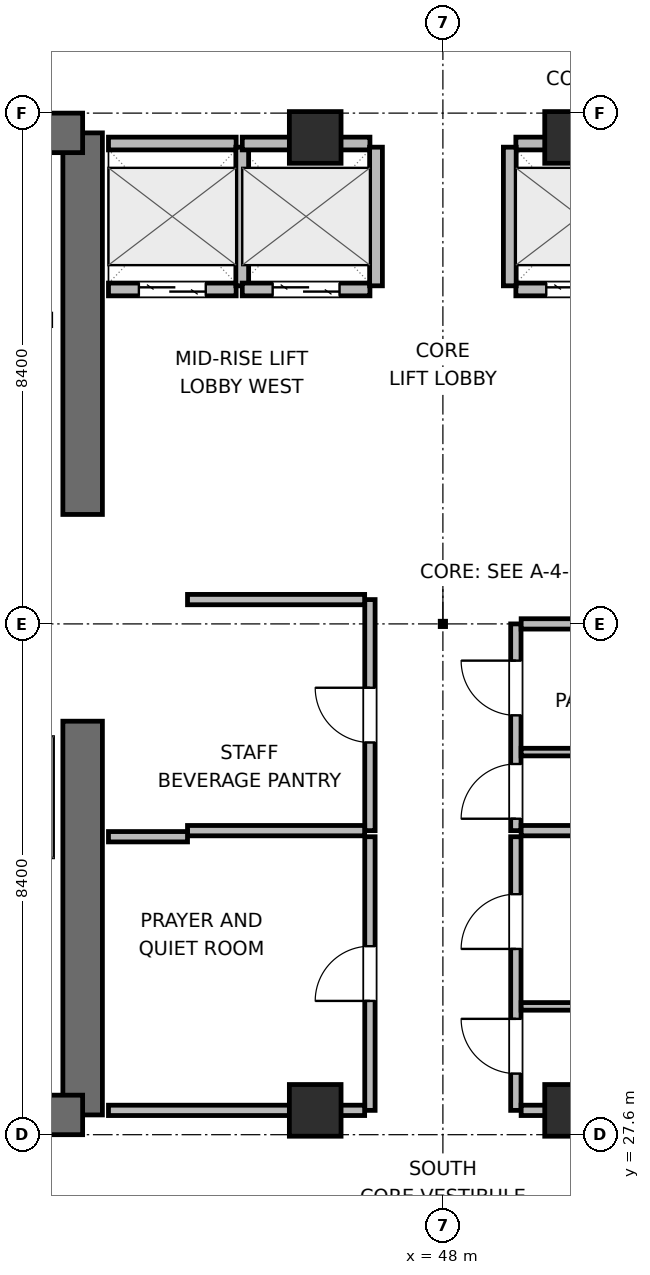
"""IFC4 building model, lengths in metres.
Left out: names, types, materials, properties, quantities, classifications, styles, units other than length and angle.
Written with IfcOpenShell. Run it as: python <this file> out.ifc"""

import sys

from ifc_helpers import new_model, si_unit, direction, frame, frame_2d, origin, origin_2d, place, context, subcontext, project, spatial, rectangle, extrude, element, fill, save


model = new_model("IFC4")
c1 = context("Model", 3, precision=1e-05, world=origin(), true_north=direction((0.0, 1.0)))
c2 = subcontext(c1, "Body", "Model", "MODEL_VIEW")
j1 = project(units=[si_unit("LENGTHUNIT", "METRE"), si_unit("PLANEANGLEUNIT", "RADIAN")], contexts=[c1])
p1 = place(None, origin())
s1 = spatial("IfcSite", under=j1, at=p1, CompositionType="ELEMENT")
p2 = place(p1, origin())
s2 = spatial("IfcBuilding", under=s1, at=p2, CompositionType="ELEMENT")
p3 = place(p2, frame((0.0, 0.0, 201.9)))
s3 = spatial("IfcBuildingStorey", under=s2, at=p3, CompositionType="ELEMENT", Elevation=201.9)
p4 = place(p3, frame((42.075, 27.925, 0.0), z_axis=(0.0, 0.0, 1.0), x_axis=(0.0, 1.0, 0.0)))
e1 = element("IfcWall", 1, at=p4, inside=s3, PredefinedType="SHEAR", context=c2, shape_type="SweptSolid", body=[
    extrude(rectangle(XDim=6.475, YDim=0.65, at=frame_2d((3.237, 0.0))), origin(), (0.0, 0.0, 1.0), 3.9),
])
p5 = place(p3, frame((42.075, 37.8, 0.0), z_axis=(0.0, 0.0, 1.0), x_axis=(0.0, 1.0, 0.0)))
e2 = element("IfcWall", 2, at=p5, inside=s3, PredefinedType="SHEAR", context=c2, shape_type="SweptSolid", body=[
    extrude(rectangle(XDim=6.275, YDim=0.65, at=frame_2d((3.137, 0.0))), origin(), (0.0, 0.0, 1.0), 3.9),
])
p6 = place(p3, frame((32.725, 27.925, 0.0), z_axis=(0.0, 0.0, 1.0), x_axis=(1.0, 0.0, 0.0)))
e3 = element("IfcWall", 3, at=p6, inside=s3, PredefinedType="SHEAR", context=c2, shape_type="SweptSolid", body=[
    extrude(rectangle(XDim=9.35, YDim=0.65, at=frame_2d((4.675, 0.0))), origin(), (0.0, 0.0, 1.0), 3.9),
])
p7 = place(p6, frame((5.025, 0.0, 0.0)))
e4 = element("IfcOpeningElement", 4, at=p7, cuts=e3, PredefinedType="OPENING", context=c2, shape_type="SweptSolid", body=[
    extrude(rectangle(XDim=1.05, YDim=2.04, at=frame_2d((0.525, 1.02))), frame((0.0, 0.335, 0.0), z_axis=(0.0, -1.0, 0.0), x_axis=(1.0, 0.0, 0.0)), (0.0, 0.0, 1.0), 0.67),
])
p8 = place(p3, frame((32.725, 44.075, 0.0), z_axis=(0.0, 0.0, 1.0), x_axis=(1.0, 0.0, 0.0)))
e5 = element("IfcWall", 5, at=p8, inside=s3, PredefinedType="SHEAR", context=c2, shape_type="SweptSolid", body=[
    extrude(rectangle(XDim=9.35, YDim=0.65, at=frame_2d((4.675, 0.0))), origin(), (0.0, 0.0, 1.0), 3.9),
])
p9 = place(p8, frame((1.025, 0.0, 0.0)))
e6 = element("IfcOpeningElement", 6, at=p9, cuts=e5, PredefinedType="OPENING", context=c2, shape_type="SweptSolid", body=[
    extrude(rectangle(XDim=0.95, YDim=2.04, at=frame_2d((0.475, 1.02))), frame((0.0, 0.335, 0.0), z_axis=(0.0, -1.0, 0.0), x_axis=(1.0, 0.0, 0.0)), (0.0, 0.0, 1.0), 0.67),
])
p10 = place(p8, frame((4.275, 0.0, 0.0)))
e7 = element("IfcOpeningElement", 7, at=p10, cuts=e5, PredefinedType="OPENING", context=c2, shape_type="SweptSolid", body=[
    extrude(rectangle(XDim=0.9, YDim=2.02, at=frame_2d((0.45, 1.01))), frame((0.0, 0.335, 0.0), z_axis=(0.0, -1.0, 0.0), x_axis=(1.0, 0.0, 0.0)), (0.0, 0.0, 1.0), 0.67),
])
p11 = place(p8, frame((7.175, 0.0, 0.0)))
e8 = element("IfcOpeningElement", 8, at=p11, cuts=e5, PredefinedType="OPENING", context=c2, shape_type="SweptSolid", body=[
    extrude(rectangle(XDim=0.9, YDim=2.02, at=frame_2d((0.45, 1.01))), frame((0.0, 0.335, 0.0), z_axis=(0.0, -1.0, 0.0), x_axis=(1.0, 0.0, 0.0)), (0.0, 0.0, 1.0), 0.67),
])
for number, where, z_axis, x_axis in (
    (9, (45.9, 28.0, 0.0), (0.0, 0.0, 1.0), (1.0, 0.0, 0.0)),
    (10, (50.1, 28.0, 0.0), (0.0, 0.0, 1.0), (1.0, 0.0, 0.0)),
    (11, (45.9, 44.0, 0.0), (0.0, 0.0, 1.0), (1.0, 0.0, 0.0)),
    (12, (50.1, 44.0, 0.0), (0.0, 0.0, 1.0), (1.0, 0.0, 0.0)),
):
    element("IfcColumn", number, at=place(p3, frame(where, z_axis=z_axis, x_axis=x_axis)), inside=s3, PredefinedType="COLUMN", context=c2, shape_type="SweptSolid", body=[
        extrude(rectangle(XDim=0.85, YDim=0.85, at=origin_2d()), origin(), (0.0, 0.0, 1.0), 3.9),
    ])
p12 = place(p3, frame((42.5, 41.5, 0.0), z_axis=(0.0, 0.0, 1.0), x_axis=(1.0, 0.0, 0.0)))
e13 = element("IfcWall", 13, at=p12, inside=s3, PredefinedType="PARTITIONING", context=c2, shape_type="SweptSolid", body=[
    extrude(rectangle(XDim=2.1, YDim=0.21, at=frame_2d((1.05, 0.0))), origin(), (0.0, 0.0, 1.0), 3.68),
])
p13 = place(p12, frame((0.5, 0.0, 0.0)))
e14 = element("IfcOpeningElement", 14, at=p13, cuts=e13, PredefinedType="OPENING", context=c2, shape_type="SweptSolid", body=[
    extrude(rectangle(XDim=1.1, YDim=2.04, at=frame_2d((0.55, 1.02))), frame((0.0, 0.115, 0.0), z_axis=(0.0, -1.0, 0.0), x_axis=(1.0, 0.0, 0.0)), (0.0, 0.0, 1.0), 0.23),
])
p14 = place(p3, frame((42.5, 43.9, 0.0), z_axis=(0.0, 0.0, 1.0), x_axis=(1.0, 0.0, 0.0)))
e15 = element("IfcWall", 15, at=p14, inside=s3, PredefinedType="PARTITIONING", context=c2, shape_type="SweptSolid", body=[
    extrude(rectangle(XDim=2.1, YDim=0.21, at=frame_2d((1.05, 0.0))), origin(), (0.0, 0.0, 1.0), 2.765),
])
p15 = place(p3, frame((44.7, 41.56, 0.0), z_axis=(0.0, 0.0, 1.0), x_axis=(0.0, 1.0, 0.0)))
e16 = element("IfcWall", 16, at=p15, inside=s3, PredefinedType="PARTITIONING", context=c2, shape_type="SweptSolid", body=[
    extrude(rectangle(XDim=2.28, YDim=0.21, at=frame_2d((1.14, 0.0))), origin(), (0.0, 0.0, 1.0), 3.68),
])
p16 = place(p3, frame((44.7, 41.5, 0.0), z_axis=(0.0, 0.0, 1.0), x_axis=(1.0, 0.0, 0.0)))
e17 = element("IfcWall", 17, at=p16, inside=s3, PredefinedType="PARTITIONING", context=c2, shape_type="SweptSolid", body=[
    extrude(rectangle(XDim=2.1, YDim=0.21, at=frame_2d((1.05, 0.0))), origin(), (0.0, 0.0, 1.0), 3.68),
])
p17 = place(p16, frame((0.5, 0.0, 0.0)))
e18 = element("IfcOpeningElement", 18, at=p17, cuts=e17, PredefinedType="OPENING", context=c2, shape_type="SweptSolid", body=[
    extrude(rectangle(XDim=1.1, YDim=2.04, at=frame_2d((0.55, 1.02))), frame((0.0, 0.115, 0.0), z_axis=(0.0, -1.0, 0.0), x_axis=(1.0, 0.0, 0.0)), (0.0, 0.0, 1.0), 0.23),
])
p18 = place(p3, frame((44.7, 43.9, 0.0), z_axis=(0.0, 0.0, 1.0), x_axis=(1.0, 0.0, 0.0)))
e19 = element("IfcWall", 19, at=p18, inside=s3, PredefinedType="PARTITIONING", context=c2, shape_type="SweptSolid", body=[
    extrude(rectangle(XDim=2.1, YDim=0.21, at=frame_2d((1.05, 0.0))), origin(), (0.0, 0.0, 1.0), 2.765),
])
p19 = place(p3, frame((46.9, 41.56, 0.0), z_axis=(0.0, 0.0, 1.0), x_axis=(0.0, 1.0, 0.0)))
e20 = element("IfcWall", 20, at=p19, inside=s3, PredefinedType="PARTITIONING", context=c2, shape_type="SweptSolid", body=[
    extrude(rectangle(XDim=2.28, YDim=0.21, at=frame_2d((1.14, 0.0))), origin(), (0.0, 0.0, 1.0), 3.68),
])
p20 = place(p3, frame((49.2, 41.5, 0.0), z_axis=(0.0, 0.0, 1.0), x_axis=(1.0, 0.0, 0.0)))
e21 = element("IfcWall", 21, at=p20, inside=s3, PredefinedType="PARTITIONING", context=c2, shape_type="SweptSolid", body=[
    extrude(rectangle(XDim=2.1, YDim=0.21, at=frame_2d((1.05, 0.0))), origin(), (0.0, 0.0, 1.0), 3.68),
])
p21 = place(p20, frame((0.5, 0.0, 0.0)))
e22 = element("IfcOpeningElement", 22, at=p21, cuts=e21, PredefinedType="OPENING", context=c2, shape_type="SweptSolid", body=[
    extrude(rectangle(XDim=1.1, YDim=2.04, at=frame_2d((0.55, 1.02))), frame((0.0, 0.115, 0.0), z_axis=(0.0, -1.0, 0.0), x_axis=(1.0, 0.0, 0.0)), (0.0, 0.0, 1.0), 0.23),
])
p22 = place(p3, frame((49.2, 43.9, 0.0), z_axis=(0.0, 0.0, 1.0), x_axis=(1.0, 0.0, 0.0)))
e23 = element("IfcWall", 23, at=p22, inside=s3, PredefinedType="PARTITIONING", context=c2, shape_type="SweptSolid", body=[
    extrude(rectangle(XDim=2.1, YDim=0.21, at=frame_2d((1.05, 0.0))), origin(), (0.0, 0.0, 1.0), 2.765),
])
p23 = place(p3, frame((49.1, 41.56, 0.0), z_axis=(0.0, 0.0, 1.0), x_axis=(0.0, 1.0, 0.0)))
e24 = element("IfcWall", 24, at=p23, inside=s3, PredefinedType="PARTITIONING", context=c2, shape_type="SweptSolid", body=[
    extrude(rectangle(XDim=2.28, YDim=0.21, at=frame_2d((1.14, 0.0))), origin(), (0.0, 0.0, 1.0), 3.68),
])
p24 = place(p3, frame((46.8, 32.6, 0.0), z_axis=(0.0, 0.0, 1.0), x_axis=(0.0, 1.0, 0.0)))
e25 = element("IfcWall", 25, at=p24, inside=s3, PredefinedType="PARTITIONING", context=c2, shape_type="SweptSolid", body=[
    extrude(rectangle(XDim=3.8, YDim=0.17, at=frame_2d((1.9, 0.0))), origin(), (0.0, 0.0, 1.0), 3.68),
])
p25 = place(p24, frame((1.45, 0.0, 0.0)))
e26 = element("IfcOpeningElement", 26, at=p25, cuts=e25, PredefinedType="OPENING", context=c2, shape_type="SweptSolid", body=[
    extrude(rectangle(XDim=0.9, YDim=2.02, at=frame_2d((0.45, 1.01))), frame((0.0, 0.095, 0.0), z_axis=(0.0, -1.0, 0.0), x_axis=(1.0, 0.0, 0.0)), (0.0, 0.0, 1.0), 0.19),
])
for number, where, z_axis, x_axis in (
    (27, (43.8, 32.6, 0.0), (0.0, 0.0, 1.0), (1.0, 0.0, 0.0)),
    (28, (43.8, 36.4, 0.0), (0.0, 0.0, 1.0), (1.0, 0.0, 0.0)),
):
    element("IfcWall", number, at=place(p3, frame(where, z_axis=z_axis, x_axis=x_axis)), inside=s3, PredefinedType="PARTITIONING", context=c2, shape_type="SweptSolid", body=[
        extrude(rectangle(XDim=2.913, YDim=0.17, at=frame_2d((1.457, 0.0))), origin(), (0.0, 0.0, 1.0), 3.68),
    ])
p26 = place(p3, frame((49.2, 32.6, 0.0), z_axis=(0.0, 0.0, 1.0), x_axis=(0.0, 1.0, 0.0)))
e29 = element("IfcWall", 29, at=p26, inside=s3, PredefinedType="PARTITIONING", context=c2, shape_type="SweptSolid", body=[
    extrude(rectangle(XDim=3.4, YDim=0.17, at=frame_2d((1.7, 0.0))), origin(), (0.0, 0.0, 1.0), 3.68),
])
p27 = place(p26, frame((0.196, 0.0, 0.0)))
e30 = element("IfcOpeningElement", 30, at=p27, cuts=e29, PredefinedType="OPENING", context=c2, shape_type="SweptSolid", body=[
    extrude(rectangle(XDim=0.9, YDim=2.02, at=frame_2d((0.45, 1.01))), frame((0.0, 0.095, 0.0), z_axis=(0.0, -1.0, 0.0), x_axis=(1.0, 0.0, 0.0)), (0.0, 0.0, 1.0), 0.19),
])
p28 = place(p26, frame((1.896, 0.0, 0.0)))
e31 = element("IfcOpeningElement", 31, at=p28, cuts=e29, PredefinedType="OPENING", context=c2, shape_type="SweptSolid", body=[
    extrude(rectangle(XDim=0.9, YDim=2.02, at=frame_2d((0.45, 1.01))), frame((0.0, 0.095, 0.0), z_axis=(0.0, -1.0, 0.0), x_axis=(1.0, 0.0, 0.0)), (0.0, 0.0, 1.0), 0.19),
])
for number, where, z_axis, x_axis in (
    (32, (49.287, 32.6, 0.0), (0.0, 0.0, 1.0), (1.0, 0.0, 0.0)),
    (33, (49.287, 36.0, 0.0), (0.0, 0.0, 1.0), (1.0, 0.0, 0.0)),
):
    element("IfcWall", number, at=place(p3, frame(where, z_axis=z_axis, x_axis=x_axis)), inside=s3, PredefinedType="PARTITIONING", context=c2, shape_type="SweptSolid", body=[
        extrude(rectangle(XDim=2.913, YDim=0.17, at=frame_2d((1.457, 0.0))), origin(), (0.0, 0.0, 1.0), 3.68),
    ])
p29 = place(p3, frame((49.287, 33.892, 0.0), z_axis=(0.0, 0.0, 1.0), x_axis=(1.0, 0.0, 0.0)))
e34 = element("IfcWall", 34, at=p29, inside=s3, PredefinedType="PARTITIONING", context=c2, shape_type="SweptSolid", body=[
    extrude(rectangle(XDim=2.913, YDim=0.125, at=frame_2d((1.457, 0.0))), origin(), (0.0, 0.0, 1.0), 3.68),
])
p30 = place(p3, frame((46.8, 28.0, 0.0), z_axis=(0.0, 0.0, 1.0), x_axis=(0.0, 1.0, 0.0)))
e35 = element("IfcWall", 35, at=p30, inside=s3, PredefinedType="PARTITIONING", context=c2, shape_type="SweptSolid", body=[
    extrude(rectangle(XDim=4.5, YDim=0.17, at=frame_2d((2.25, 0.0))), origin(), (0.0, 0.0, 1.0), 3.68),
])
p31 = place(p30, frame((1.8, 0.0, 0.0)))
e36 = element("IfcOpeningElement", 36, at=p31, cuts=e35, PredefinedType="OPENING", context=c2, shape_type="SweptSolid", body=[
    extrude(rectangle(XDim=0.9, YDim=2.02, at=frame_2d((0.45, 1.01))), frame((0.0, 0.095, 0.0), z_axis=(0.0, -1.0, 0.0), x_axis=(1.0, 0.0, 0.0)), (0.0, 0.0, 1.0), 0.19),
])
p32 = place(p3, frame((42.5, 28.0, 0.0), z_axis=(0.0, 0.0, 1.0), x_axis=(1.0, 0.0, 0.0)))
e37 = element("IfcWall", 37, at=p32, inside=s3, PredefinedType="PARTITIONING", context=c2, shape_type="SweptSolid", body=[
    extrude(rectangle(XDim=4.213, YDim=0.17, at=frame_2d((2.106, 0.0))), origin(), (0.0, 0.0, 1.0), 2.765),
])
p33 = place(p3, frame((42.5, 32.5, 0.0), z_axis=(0.0, 0.0, 1.0), x_axis=(1.0, 0.0, 0.0)))
e38 = element("IfcWall", 38, at=p33, inside=s3, PredefinedType="PARTITIONING", context=c2, shape_type="SweptSolid", body=[
    extrude(rectangle(XDim=1.3, YDim=0.17, at=frame_2d((0.65, 0.0))), origin(), (0.0, 0.0, 1.0), 3.68),
])
p34 = place(p3, frame((49.2, 28.0, 0.0), z_axis=(0.0, 0.0, 1.0), x_axis=(0.0, 1.0, 0.0)))
e39 = element("IfcWall", 39, at=p34, inside=s3, PredefinedType="PARTITIONING", context=c2, shape_type="SweptSolid", body=[
    extrude(rectangle(XDim=4.5, YDim=0.17, at=frame_2d((2.25, 0.0))), origin(), (0.0, 0.0, 1.0), 3.68),
])
p35 = place(p34, frame((0.605, 0.0, 0.0)))
e40 = element("IfcOpeningElement", 40, at=p35, cuts=e39, PredefinedType="OPENING", context=c2, shape_type="SweptSolid", body=[
    extrude(rectangle(XDim=0.9, YDim=2.02, at=frame_2d((0.45, 1.01))), frame((0.0, 0.095, 0.0), z_axis=(0.0, -1.0, 0.0), x_axis=(1.0, 0.0, 0.0)), (0.0, 0.0, 1.0), 0.19),
])
p36 = place(p34, frame((2.655, 0.0, 0.0)))
e41 = element("IfcOpeningElement", 41, at=p36, cuts=e39, PredefinedType="OPENING", context=c2, shape_type="SweptSolid", body=[
    extrude(rectangle(XDim=0.9, YDim=2.02, at=frame_2d((0.45, 1.01))), frame((0.0, 0.095, 0.0), z_axis=(0.0, -1.0, 0.0), x_axis=(1.0, 0.0, 0.0)), (0.0, 0.0, 1.0), 0.19),
])
p37 = place(p3, frame((49.287, 28.0, 0.0), z_axis=(0.0, 0.0, 1.0), x_axis=(1.0, 0.0, 0.0)))
e42 = element("IfcWall", 42, at=p37, inside=s3, PredefinedType="PARTITIONING", context=c2, shape_type="SweptSolid", body=[
    extrude(rectangle(XDim=4.213, YDim=0.17, at=frame_2d((2.106, 0.0))), origin(), (0.0, 0.0, 1.0), 2.765),
])
p38 = place(p3, frame((49.287, 29.71, 0.0), z_axis=(0.0, 0.0, 1.0), x_axis=(1.0, 0.0, 0.0)))
e43 = element("IfcWall", 43, at=p38, inside=s3, PredefinedType="PARTITIONING", context=c2, shape_type="SweptSolid", body=[
    extrude(rectangle(XDim=4.213, YDim=0.125, at=frame_2d((2.106, 0.0))), origin(), (0.0, 0.0, 1.0), 3.68),
])
p39 = place(p13, origin())
e44 = element("IfcDoor", 44, at=p39, inside=s3, OperationType="DOUBLE_DOOR_SLIDING", PredefinedType="DOOR", context=c2, shape_type="SweptSolid", body=[
    extrude(rectangle(XDim=1.1, YDim=2.04, at=frame_2d((0.55, 1.02))), frame((0.0, 0.025, 0.0), z_axis=(0.0, -1.0, 0.0), x_axis=(1.0, 0.0, 0.0)), (0.0, 0.0, 1.0), 0.05),
])
fill(e14, e44)
p40 = place(p17, origin())
e45 = element("IfcDoor", 45, at=p40, inside=s3, OperationType="DOUBLE_DOOR_SLIDING", PredefinedType="DOOR", context=c2, shape_type="SweptSolid", body=[
    extrude(rectangle(XDim=1.1, YDim=2.04, at=frame_2d((0.55, 1.02))), frame((0.0, 0.025, 0.0), z_axis=(0.0, -1.0, 0.0), x_axis=(1.0, 0.0, 0.0)), (0.0, 0.0, 1.0), 0.05),
])
fill(e18, e45)
p41 = place(p21, origin())
e46 = element("IfcDoor", 46, at=p41, inside=s3, OperationType="DOUBLE_DOOR_SLIDING", PredefinedType="DOOR", context=c2, shape_type="SweptSolid", body=[
    extrude(rectangle(XDim=1.1, YDim=2.04, at=frame_2d((0.55, 1.02))), frame((0.0, 0.025, 0.0), z_axis=(0.0, -1.0, 0.0), x_axis=(1.0, 0.0, 0.0)), (0.0, 0.0, 1.0), 0.05),
])
fill(e22, e46)
p42 = place(p25, origin())
e47 = element("IfcDoor", 47, at=p42, inside=s3, OperationType="SINGLE_SWING_RIGHT", PredefinedType="DOOR", context=c2, shape_type="SweptSolid", body=[
    extrude(rectangle(XDim=0.9, YDim=2.02, at=frame_2d((0.45, 1.01))), frame((0.0, 0.025, 0.0), z_axis=(0.0, -1.0, 0.0), x_axis=(1.0, 0.0, 0.0)), (0.0, 0.0, 1.0), 0.05),
])
fill(e26, e47)
p43 = place(p27, origin())
e48 = element("IfcDoor", 48, at=p43, inside=s3, OperationType="SINGLE_SWING_LEFT", PredefinedType="DOOR", context=c2, shape_type="SweptSolid", body=[
    extrude(rectangle(XDim=0.9, YDim=2.02, at=frame_2d((0.45, 1.01))), frame((0.0, 0.025, 0.0), z_axis=(0.0, -1.0, 0.0), x_axis=(1.0, 0.0, 0.0)), (0.0, 0.0, 1.0), 0.05),
])
fill(e30, e48)
p44 = place(p28, origin())
e49 = element("IfcDoor", 49, at=p44, inside=s3, OperationType="SINGLE_SWING_RIGHT", PredefinedType="DOOR", context=c2, shape_type="SweptSolid", body=[
    extrude(rectangle(XDim=0.9, YDim=2.02, at=frame_2d((0.45, 1.01))), frame((0.0, 0.025, 0.0), z_axis=(0.0, -1.0, 0.0), x_axis=(1.0, 0.0, 0.0)), (0.0, 0.0, 1.0), 0.05),
])
fill(e31, e49)
p45 = place(p31, origin())
e50 = element("IfcDoor", 50, at=p45, inside=s3, OperationType="SINGLE_SWING_LEFT", PredefinedType="DOOR", context=c2, shape_type="SweptSolid", body=[
    extrude(rectangle(XDim=0.9, YDim=2.02, at=frame_2d((0.45, 1.01))), frame((0.0, 0.025, 0.0), z_axis=(0.0, -1.0, 0.0), x_axis=(1.0, 0.0, 0.0)), (0.0, 0.0, 1.0), 0.05),
])
fill(e36, e50)
p46 = place(p35, origin())
e51 = element("IfcDoor", 51, at=p46, inside=s3, OperationType="SINGLE_SWING_RIGHT", PredefinedType="DOOR", context=c2, shape_type="SweptSolid", body=[
    extrude(rectangle(XDim=0.9, YDim=2.02, at=frame_2d((0.45, 1.01))), frame((0.0, 0.025, 0.0), z_axis=(0.0, -1.0, 0.0), x_axis=(1.0, 0.0, 0.0)), (0.0, 0.0, 1.0), 0.05),
])
fill(e40, e51)
p47 = place(p36, origin())
e52 = element("IfcDoor", 52, at=p47, inside=s3, OperationType="SINGLE_SWING_LEFT", PredefinedType="DOOR", context=c2, shape_type="SweptSolid", body=[
    extrude(rectangle(XDim=0.9, YDim=2.02, at=frame_2d((0.45, 1.01))), frame((0.0, 0.025, 0.0), z_axis=(0.0, -1.0, 0.0), x_axis=(1.0, 0.0, 0.0)), (0.0, 0.0, 1.0), 0.05),
])
fill(e41, e52)
save(model, sys.argv[1])
